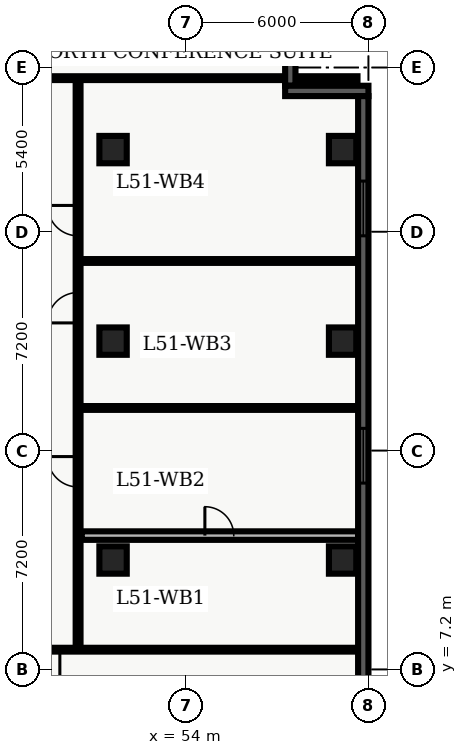
"""IFC4 building model, lengths in metres.
Left out: names, types, materials, properties, quantities, classifications, styles, units other than length and angle.
Written with IfcOpenShell. Run it as: python <this file> out.ifc"""

import sys

from ifc_helpers import new_model, entity, si_unit, converted_unit, direction, frame, origin_with_axes, origin_2d_with_axis, place, context, subcontext, project, spatial, polyline, rectangle, outline, extrude, element, fill, save


model = new_model("IFC4")
c1 = context("Model", 3, precision=1e-05, world=origin_with_axes(), true_north=direction((0.0, 1.0)))
c2 = subcontext(c1, "Body", "Model", "MODEL_VIEW")
j1 = project(units=[si_unit("LENGTHUNIT", "METRE"), converted_unit("PLANEANGLEUNIT", "DEGREE", entity("IfcPlaneAngleMeasure", 0.017), si_unit("PLANEANGLEUNIT", "RADIAN"), dimensions=[0, 0, 0, 0, 0, 0, 0])], contexts=[c1])
p1 = place(None, origin_with_axes())
s1 = spatial("IfcSite", under=j1, at=p1, CompositionType="ELEMENT")
p2 = place(p1, origin_with_axes())
s2 = spatial("IfcBuilding", under=s1, at=p2, CompositionType="ELEMENT")
p3 = place(p2, frame((0.0, 0.0, 208.2), z_axis=(0.0, 0.0, 1.0), x_axis=(1.0, 0.0, 0.0)))
s3 = spatial("IfcBuildingStorey", under=s2, at=p3, CompositionType="ELEMENT", Elevation=208.2)
for number, where, z_axis, x_axis in (
    (1, (51.6, 10.8, 0.0), (0.0, 0.0, 1.0), (1.0, 0.0, 0.0)),
    (2, (51.6, 18.0, 0.0), (0.0, 0.0, 1.0), (1.0, 0.0, 0.0)),
    (3, (51.6, 24.3, 0.0), (0.0, 0.0, 1.0), (1.0, 0.0, 0.0)),
    (4, (59.15, 10.8, 0.0), (0.0, 0.0, 1.0), (1.0, 0.0, 0.0)),
    (5, (59.15, 18.0, 0.0), (0.0, 0.0, 1.0), (1.0, 0.0, 0.0)),
    (6, (59.15, 24.3, 0.0), (0.0, 0.0, 1.0), (1.0, 0.0, 0.0)),
):
    element("IfcColumn", number, at=place(p3, frame(where, z_axis=z_axis, x_axis=x_axis)), inside=s3, PredefinedType="COLUMN", context=c2, shape_type="SweptSolid", body=[
        extrude(rectangle(XDim=0.9, YDim=0.9, at=origin_2d_with_axis()), origin_with_axes(), (0.0, 0.0, 1.0), 3.9),
    ])
p4 = place(p3, frame((50.45, 7.85, 0.0), z_axis=(0.0, 0.0, 1.0), x_axis=(0.0, 1.0, 0.0)))
e7 = element("IfcWall", 7, at=p4, inside=s3, PredefinedType="PARTITIONING", context=c2, shape_type="SweptSolid", body=[
    extrude(outline(polyline([(0.0, -0.08), (18.8, -0.08), (18.8, 0.08), (0.0, 0.08), (0.0, -0.08)])), origin_with_axes(), (0.0, 0.0, 1.0), 2.7),
])
p5 = place(p4, frame((5.852, 0.0, 0.0), z_axis=(0.0, 0.0, 1.0), x_axis=(1.0, 0.0, 0.0)))
e8 = element("IfcOpeningElement", 8, at=p5, cuts=e7, PredefinedType="OPENING", context=c2, shape_type="SweptSolid", body=[
    extrude(rectangle(XDim=1.0, YDim=0.18, at=origin_2d_with_axis()), origin_with_axes(), (0.0, 0.0, 1.0), 2.15),
])
p6 = place(p4, frame((11.249, 0.0, 0.0), z_axis=(0.0, 0.0, 1.0), x_axis=(1.0, 0.0, 0.0)))
e9 = element("IfcOpeningElement", 9, at=p6, cuts=e7, PredefinedType="OPENING", context=c2, shape_type="SweptSolid", body=[
    extrude(rectangle(XDim=1.0, YDim=0.18, at=origin_2d_with_axis()), origin_with_axes(), (0.0, 0.0, 1.0), 2.15),
])
p7 = place(p4, frame((14.113, 0.0, 0.0), z_axis=(0.0, 0.0, 1.0), x_axis=(1.0, 0.0, 0.0)))
e10 = element("IfcOpeningElement", 10, at=p7, cuts=e7, PredefinedType="OPENING", context=c2, shape_type="SweptSolid", body=[
    extrude(rectangle(XDim=1.0, YDim=0.18, at=origin_2d_with_axis()), origin_with_axes(), (0.0, 0.0, 1.0), 2.15),
])
p8 = place(p3, frame((59.665, 7.85, 0.0), z_axis=(0.0, 0.0, 1.0), x_axis=(-1.0, 0.0, 0.0)))
e11 = element("IfcWall", 11, at=p8, inside=s3, PredefinedType="PARTITIONING", context=c2, shape_type="SweptSolid", body=[
    extrude(outline(polyline([(0.0, -0.062), (11.615, -0.062), (11.615, 0.062), (0.0, 0.062), (0.0, -0.062)])), origin_with_axes(), (0.0, 0.0, 1.0), 2.7),
])
p9 = place(p8, frame((10.315, 0.0, 0.0), z_axis=(0.0, 0.0, 1.0), x_axis=(1.0, 0.0, 0.0)))
e12 = element("IfcOpeningElement", 12, at=p9, cuts=e11, PredefinedType="OPENING", context=c2, shape_type="SweptSolid", body=[
    extrude(rectangle(XDim=1.0, YDim=0.145, at=origin_2d_with_axis()), origin_with_axes(), (0.0, 0.0, 1.0), 2.15),
])
p10 = place(p3, frame((38.735, 26.65, 0.0), z_axis=(0.0, 0.0, 1.0), x_axis=(1.0, 0.0, 0.0)))
e13 = element("IfcWall", 13, at=p10, inside=s3, PredefinedType="PARTITIONING", context=c2, shape_type="SweptSolid", body=[
    extrude(outline(polyline([(0.0, -0.062), (20.905, -0.062), (20.905, 0.062), (0.0, 0.062), (0.0, -0.062)])), origin_with_axes(), (0.0, 0.0, 1.0), 2.7),
])
p11 = place(p10, frame((4.265, 0.0, 0.0), z_axis=(0.0, 0.0, 1.0), x_axis=(1.0, 0.0, 0.0)))
e14 = element("IfcOpeningElement", 14, at=p11, cuts=e13, PredefinedType="OPENING", context=c2, shape_type="SweptSolid", body=[
    extrude(rectangle(XDim=1.0, YDim=0.145, at=origin_2d_with_axis()), origin_with_axes(), (0.0, 0.0, 1.0), 2.15),
])
p12 = place(p3, frame((50.57, 11.603, 0.0), z_axis=(0.0, 0.0, 1.0), x_axis=(1.0, 0.0, 0.0)))
e15 = element("IfcWall", 15, at=p12, inside=s3, PredefinedType="PARTITIONING", context=c2, shape_type="SweptSolid", body=[
    extrude(outline(polyline([(0.0, -0.14), (9.095, -0.14), (9.095, 0.14), (0.0, 0.14), (0.0, -0.14)])), origin_with_axes(), (0.0, 0.0, 1.0), 2.7),
])
p13 = place(p12, frame((4.525, 0.0, 0.0), z_axis=(0.0, 0.0, 1.0), x_axis=(1.0, 0.0, 0.0)))
e16 = element("IfcOpeningElement", 16, at=p13, cuts=e15, PredefinedType="OPENING", context=c2, shape_type="SweptSolid", body=[
    extrude(rectangle(XDim=0.95, YDim=0.3, at=origin_2d_with_axis()), origin_with_axes(), (0.0, 0.0, 1.0), 2.15),
])
for number, where, z_axis, x_axis in (
    (17, (50.57, 15.801, 0.0), (0.0, 0.0, 1.0), (1.0, 0.0, 0.0)),
    (18, (50.57, 20.636, 0.0), (0.0, 0.0, 1.0), (1.0, 0.0, 0.0)),
):
    element("IfcWall", number, at=place(p3, frame(where, z_axis=z_axis, x_axis=x_axis)), inside=s3, PredefinedType="PARTITIONING", context=c2, shape_type="SweptSolid", body=[
        extrude(outline(polyline([(0.0, -0.062), (9.095, -0.062), (9.095, 0.062), (0.0, 0.062), (0.0, -0.062)])), origin_with_axes(), (0.0, 0.0, 1.0), 2.7),
    ])
p14 = place(p3, frame((57.43, 28.46, 0.0), z_axis=(0.0, 0.0, 1.0), x_axis=(0.0, -1.0, 0.0)))
e19 = element("IfcWall", 19, at=p14, inside=s3, PredefinedType="SOLIDWALL", context=c2, shape_type="SweptSolid", body=[
    extrude(outline(polyline([(0.0, -0.17), (2.06, -0.17), (2.06, 0.17), (0.0, 0.17), (0.0, -0.17)])), origin_with_axes(), (0.0, 0.0, 1.0), 3.66),
])
p15 = place(p3, frame((57.26, 26.23, 0.0), z_axis=(0.0, 0.0, 1.0), x_axis=(1.0, 0.0, 0.0)))
e20 = element("IfcWall", 20, at=p15, inside=s3, PredefinedType="SOLIDWALL", context=c2, shape_type="SweptSolid", body=[
    extrude(outline(polyline([(0.0, -0.17), (2.74, -0.17), (2.74, 0.17), (0.0, 0.17), (0.0, -0.17)])), origin_with_axes(), (0.0, 0.0, 1.0), 3.66),
])
p16 = place(p3, frame((59.83, 26.06, 0.0), z_axis=(0.0, 0.0, 1.0), x_axis=(0.0, -1.0, 0.0)))
e21 = element("IfcWall", 21, at=p16, inside=s3, PredefinedType="SOLIDWALL", context=c2, shape_type="SweptSolid", body=[
    extrude(outline(polyline([(0.0, -0.17), (23.66, -0.17), (23.66, 0.17), (0.0, 0.17), (0.0, -0.17)])), origin_with_axes(), (0.0, 0.0, 1.0), 3.66),
])
p17 = place(p16, frame((3.696, 0.0, 0.45), z_axis=(0.0, 0.0, 1.0), x_axis=(1.0, 0.0, 0.0)))
e22 = element("IfcOpeningElement", 22, at=p17, cuts=e21, PredefinedType="OPENING", context=c2, shape_type="SweptSolid", body=[
    extrude(rectangle(XDim=1.8, YDim=0.36, at=origin_2d_with_axis()), origin_with_axes(), (0.0, 0.0, 1.0), 2.1),
])
p18 = place(p16, frame((11.83, 0.0, 0.45), z_axis=(0.0, 0.0, 1.0), x_axis=(1.0, 0.0, 0.0)))
e23 = element("IfcOpeningElement", 23, at=p18, cuts=e21, PredefinedType="OPENING", context=c2, shape_type="SweptSolid", body=[
    extrude(rectangle(XDim=1.8, YDim=0.36, at=origin_2d_with_axis()), origin_with_axes(), (0.0, 0.0, 1.0), 2.1),
])
p19 = place(p16, frame((20.364, 0.0, 0.45), z_axis=(0.0, 0.0, 1.0), x_axis=(1.0, 0.0, 0.0)))
e24 = element("IfcOpeningElement", 24, at=p19, cuts=e21, PredefinedType="OPENING", context=c2, shape_type="SweptSolid", body=[
    extrude(rectangle(XDim=1.8, YDim=0.36, at=origin_2d_with_axis()), origin_with_axes(), (0.0, 0.0, 1.0), 2.1),
])
p20 = place(p8, frame((10.315, 0.0, 0.0), z_axis=(0.0, 0.0, 1.0), x_axis=(1.0, 0.0, 0.0)))
e25 = element("IfcDoor", 25, at=p20, inside=s3, OperationType="SINGLE_SWING_LEFT", PredefinedType="DOOR", context=c2, shape_type="SweptSolid", body=[
    extrude(rectangle(XDim=1.0, YDim=0.075, at=origin_2d_with_axis()), origin_with_axes(), (0.0, 0.0, 1.0), 2.15),
])
fill(e12, e25)
p21 = place(p12, frame((4.525, 0.0, 0.0), z_axis=(0.0, 0.0, 1.0), x_axis=(1.0, 0.0, 0.0)))
e26 = element("IfcDoor", 26, at=p21, inside=s3, OperationType="SINGLE_SWING_LEFT", PredefinedType="DOOR", context=c2, shape_type="SweptSolid", body=[
    extrude(rectangle(XDim=0.95, YDim=0.09, at=origin_2d_with_axis()), origin_with_axes(), (0.0, 0.0, 1.0), 2.15),
])
fill(e16, e26)
p22 = place(p4, frame((5.852, 0.0, 0.0), z_axis=(0.0, 0.0, 1.0), x_axis=(1.0, 0.0, 0.0)))
e27 = element("IfcDoor", 27, at=p22, inside=s3, OperationType="SINGLE_SWING_RIGHT", PredefinedType="DOOR", context=c2, shape_type="SweptSolid", body=[
    extrude(rectangle(XDim=1.0, YDim=0.09, at=origin_2d_with_axis()), origin_with_axes(), (0.0, 0.0, 1.0), 2.15),
])
fill(e8, e27)
p23 = place(p4, frame((11.249, 0.0, 0.0), z_axis=(0.0, 0.0, 1.0), x_axis=(1.0, 0.0, 0.0)))
e28 = element("IfcDoor", 28, at=p23, inside=s3, OperationType="SINGLE_SWING_LEFT", PredefinedType="DOOR", context=c2, shape_type="SweptSolid", body=[
    extrude(rectangle(XDim=1.0, YDim=0.09, at=origin_2d_with_axis()), origin_with_axes(), (0.0, 0.0, 1.0), 2.15),
])
fill(e9, e28)
p24 = place(p4, frame((14.113, 0.0, 0.0), z_axis=(0.0, 0.0, 1.0), x_axis=(1.0, 0.0, 0.0)))
e29 = element("IfcDoor", 29, at=p24, inside=s3, OperationType="SINGLE_SWING_RIGHT", PredefinedType="DOOR", context=c2, shape_type="SweptSolid", body=[
    extrude(rectangle(XDim=1.0, YDim=0.09, at=origin_2d_with_axis()), origin_with_axes(), (0.0, 0.0, 1.0), 2.15),
])
fill(e10, e29)
p25 = place(p16, frame((3.696, 0.0, 0.45), z_axis=(0.0, 0.0, 1.0), x_axis=(1.0, 0.0, 0.0)))
e30 = element("IfcWindow", 30, at=p25, inside=s3, PredefinedType="WINDOW", context=c2, shape_type="SweptSolid", body=[
    extrude(rectangle(XDim=1.8, YDim=0.09, at=origin_2d_with_axis()), origin_with_axes(), (0.0, 0.0, 1.0), 2.1),
])
fill(e22, e30)
p26 = place(p16, frame((11.83, 0.0, 0.45), z_axis=(0.0, 0.0, 1.0), x_axis=(1.0, 0.0, 0.0)))
e31 = element("IfcWindow", 31, at=p26, inside=s3, PredefinedType="WINDOW", context=c2, shape_type="SweptSolid", body=[
    extrude(rectangle(XDim=1.8, YDim=0.09, at=origin_2d_with_axis()), origin_with_axes(), (0.0, 0.0, 1.0), 2.1),
])
fill(e23, e31)
save(model, sys.argv[1])
